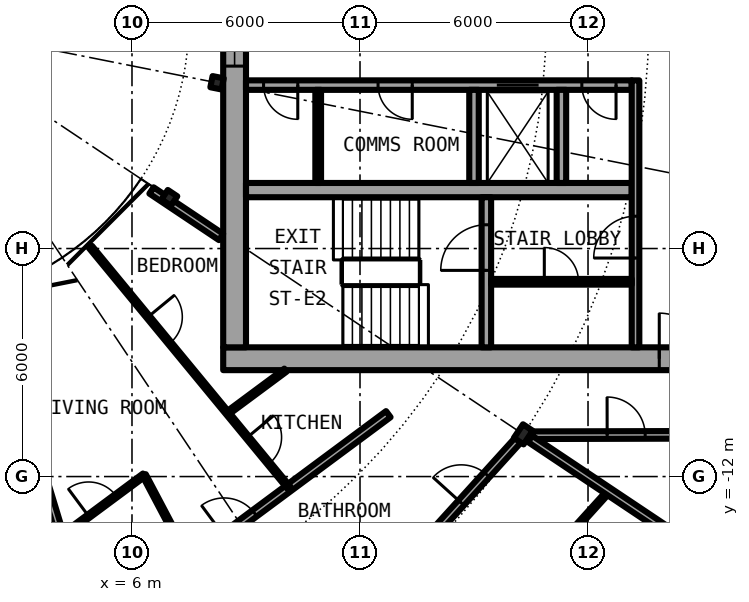
"""IFC4 building model, lengths in metres.
Left out: names, types, materials, properties, quantities, classifications, styles, units other than length and angle.
Written with IfcOpenShell. Run it as: python <this file> out.ifc"""

import sys

from ifc_helpers import new_model, si_unit, direction, frame, frame_2d, origin, origin_2d, place, context, subcontext, project, spatial, rectangle, i_section, extrude, element, fill, save


model = new_model("IFC4")
c1 = context("Model", 3, precision=1e-05, world=origin(), true_north=direction((0.0, 1.0)))
c2 = subcontext(c1, "Body", "Model", "MODEL_VIEW")
j1 = project(units=[si_unit("LENGTHUNIT", "METRE"), si_unit("PLANEANGLEUNIT", "RADIAN")], contexts=[c1])
p1 = place(None, origin())
s1 = spatial("IfcSite", under=j1, at=p1, CompositionType="ELEMENT")
p2 = place(p1, origin())
s2 = spatial("IfcBuilding", under=s1, at=p2, CompositionType="ELEMENT")
p3 = place(p2, frame((0.0, 0.0, 111.65)))
s3 = spatial("IfcBuildingStorey", under=s2, at=p3, CompositionType="ELEMENT", Elevation=111.65)
p4 = place(p3, frame((16.297, -10.889, 0.0), z_axis=(0.0, 0.0, 1.0), x_axis=(0.831469612303, -0.55557023302, 0.0)))
e1 = element("IfcColumn", 1, at=p4, inside=s3, PredefinedType="COLUMN", context=c2, shape_type="SweptSolid", body=[
    extrude(i_section(OverallWidth=0.307, OverallDepth=0.432, WebThickness=0.021, FlangeThickness=0.04, FilletRadius=0.027, at=origin_2d()), origin(), (0.0, 0.0, 1.0), 3.05),
])
for number, where, z_axis, x_axis in (
    (2, (6.984, -4.667, 0.0), (0.0, 0.0, 1.0), (0.831, -0.556, 0.0)),
    (3, (8.239, -1.639, 0.0), (0.0, 0.0, 1.0), (0.981, -0.195, 0.0)),
):
    element("IfcColumn", number, at=place(p3, frame(where, z_axis=z_axis, x_axis=x_axis)), inside=s3, PredefinedType="COLUMN", context=c2, shape_type="SweptSolid", body=[
        extrude(i_section(OverallWidth=0.3, OverallDepth=0.3, WebThickness=0.011, FlangeThickness=0.019, FilletRadius=0.027, at=origin_2d()), origin(), (0.0, 0.0, 1.0), 3.05),
    ])
p5 = place(p3, frame((8.4, -8.9, 0.0), z_axis=(0.0, 0.0, 1.0), x_axis=(1.0, 0.0, 0.0)))
e4 = element("IfcWall", 4, at=p5, inside=s3, PredefinedType="SHEAR", context=c2, shape_type="SweptSolid", body=[
    extrude(rectangle(XDim=13.8, YDim=0.6, at=frame_2d((6.9, 0.0))), origin(), (0.0, 0.0, 1.0), 3.05),
])
p6 = place(p5, frame((11.475, 0.0, 0.0)))
e5 = element("IfcOpeningElement", 5, at=p6, cuts=e4, PredefinedType="OPENING", context=c2, shape_type="SweptSolid", body=[
    extrude(rectangle(XDim=1.2, YDim=2.3, at=frame_2d((0.6, 1.15))), frame((0.0, 0.31, 0.0), z_axis=(0.0, -1.0, 0.0), x_axis=(1.0, 0.0, 0.0)), (0.0, 0.0, 1.0), 0.62),
])
p7 = place(p3, frame((8.7, -8.6, 0.0), z_axis=(0.0, 0.0, 1.0), x_axis=(0.0, 1.0, 0.0)))
e6 = element("IfcWall", 6, at=p7, inside=s3, PredefinedType="SHEAR", context=c2, shape_type="SweptSolid", body=[
    extrude(rectangle(XDim=17.2, YDim=0.6, at=frame_2d((8.6, 0.0))), origin(), (0.0, 0.0, 1.0), 3.05),
])
p8 = place(p7, frame((7.4, 0.0, 0.1)))
e7 = element("IfcOpeningElement", 7, at=p8, cuts=e6, PredefinedType="OPENING", context=c2, shape_type="SweptSolid", body=[
    extrude(rectangle(XDim=2.4, YDim=2.2, at=frame_2d((1.2, 1.1))), frame((0.0, 0.31, 0.0), z_axis=(0.0, -1.0, 0.0), x_axis=(1.0, 0.0, 0.0)), (0.0, 0.0, 1.0), 0.62),
])
p9 = place(p3, frame((19.15, -1.7, 0.0), z_axis=(0.0, 0.0, 1.0), x_axis=(-1.0, 0.0, 0.0)))
e8 = element("IfcWall", 8, at=p9, inside=s3, PredefinedType="SHEAR", context=c2, shape_type="SweptSolid", body=[
    extrude(rectangle(XDim=10.15, YDim=0.25, at=frame_2d((5.075, 0.0))), origin(), (0.0, 0.0, 1.0), 3.05),
])
p10 = place(p9, frame((2.45, 0.0, 0.0)))
e9 = element("IfcOpeningElement", 9, at=p10, cuts=e8, PredefinedType="OPENING", context=c2, shape_type="SweptSolid", body=[
    extrude(rectangle(XDim=1.1, YDim=2.3, at=frame_2d((0.55, 1.15))), frame((0.0, 0.135, 0.0), z_axis=(0.0, -1.0, 0.0), x_axis=(1.0, 0.0, 0.0)), (0.0, 0.0, 1.0), 0.27),
])
p11 = place(p9, frame((8.788, 0.0, 0.0)))
e10 = element("IfcOpeningElement", 10, at=p11, cuts=e8, PredefinedType="OPENING", context=c2, shape_type="SweptSolid", body=[
    extrude(rectangle(XDim=0.9, YDim=2.3, at=frame_2d((0.45, 1.15))), frame((0.0, 0.135, 0.0), z_axis=(0.0, -1.0, 0.0), x_axis=(1.0, 0.0, 0.0)), (0.0, 0.0, 1.0), 0.27),
])
p12 = place(p9, frame((5.775, 0.0, 0.0)))
e11 = element("IfcOpeningElement", 11, at=p12, cuts=e8, PredefinedType="OPENING", context=c2, shape_type="SweptSolid", body=[
    extrude(rectangle(XDim=0.9, YDim=2.3, at=frame_2d((0.45, 1.15))), frame((0.0, 0.135, 0.0), z_axis=(0.0, -1.0, 0.0), x_axis=(1.0, 0.0, 0.0)), (0.0, 0.0, 1.0), 0.27),
])
p13 = place(p9, frame((0.413, 0.0, 0.0)))
e12 = element("IfcOpeningElement", 12, at=p13, cuts=e8, PredefinedType="OPENING", context=c2, shape_type="SweptSolid", body=[
    extrude(rectangle(XDim=0.9, YDim=2.3, at=frame_2d((0.45, 1.15))), frame((0.0, 0.135, 0.0), z_axis=(0.0, -1.0, 0.0), x_axis=(1.0, 0.0, 0.0)), (0.0, 0.0, 1.0), 0.27),
])
p14 = place(p3, frame((9.0, -4.462, 0.0), z_axis=(0.0, 0.0, 1.0), x_axis=(1.0, 0.0, 0.0)))
e13 = element("IfcWall", 13, at=p14, inside=s3, PredefinedType="SHEAR", context=c2, shape_type="SweptSolid", body=[
    extrude(rectangle(XDim=10.15, YDim=0.375, at=frame_2d((5.075, 0.0))), origin(), (0.0, 0.0, 1.0), 3.05),
])
p15 = place(p3, frame((15.325, -8.6, 0.0), z_axis=(0.0, 0.0, 1.0), x_axis=(0.0, 1.0, 0.0)))
e14 = element("IfcWall", 14, at=p15, inside=s3, PredefinedType="SHEAR", context=c2, shape_type="SweptSolid", body=[
    extrude(rectangle(XDim=3.95, YDim=0.25, at=frame_2d((1.975, 0.0))), origin(), (0.0, 0.0, 1.0), 3.05),
])
p16 = place(p15, frame((2.025, 0.0, 0.0)))
e15 = element("IfcOpeningElement", 15, at=p16, cuts=e14, PredefinedType="OPENING", context=c2, shape_type="SweptSolid", body=[
    extrude(rectangle(XDim=1.2, YDim=2.3, at=frame_2d((0.6, 1.15))), frame((0.0, 0.135, 0.0), z_axis=(0.0, -1.0, 0.0), x_axis=(1.0, 0.0, 0.0)), (0.0, 0.0, 1.0), 0.27),
])
for number, where, z_axis, x_axis in (
    (16, (15.0, -1.825, 0.0), (0.0, 0.0, 1.0), (0.0, -1.0, 0.0)),
    (17, (17.3, -1.825, 0.0), (0.0, 0.0, 1.0), (0.0, -1.0, 0.0)),
):
    element("IfcWall", number, at=place(p3, frame(where, z_axis=z_axis, x_axis=x_axis)), inside=s3, PredefinedType="SOLIDWALL", context=c2, shape_type="SweptSolid", body=[
        extrude(rectangle(XDim=2.45, YDim=0.25, at=frame_2d((1.225, 0.0))), origin(), (0.0, 0.0, 1.0), 2.7),
    ])
p17 = place(p3, frame((19.25, -8.6, 0.0), z_axis=(0.0, 0.0, 1.0), x_axis=(0.0, 1.0, 0.0)))
e18 = element("IfcWall", 18, at=p17, inside=s3, PredefinedType="SOLIDWALL", context=c2, shape_type="SweptSolid", body=[
    extrude(rectangle(XDim=7.025, YDim=0.2, at=frame_2d((3.513, 0.0))), origin(), (0.0, 0.0, 1.0), 2.7),
])
p18 = place(p17, frame((2.35, 0.0, 0.0)))
e19 = element("IfcOpeningElement", 19, at=p18, cuts=e18, PredefinedType="OPENING", context=c2, shape_type="SweptSolid", body=[
    extrude(rectangle(XDim=1.1, YDim=2.3, at=frame_2d((0.55, 1.15))), frame((0.0, 0.11, 0.0), z_axis=(0.0, -1.0, 0.0), x_axis=(1.0, 0.0, 0.0)), (0.0, 0.0, 1.0), 0.22),
])
p19 = place(p3, frame((10.9, -1.825, 0.0), z_axis=(0.0, 0.0, 1.0), x_axis=(0.0, -1.0, 0.0)))
e20 = element("IfcWall", 20, at=p19, inside=s3, PredefinedType="PARTITIONING", context=c2, shape_type="SweptSolid", body=[
    extrude(rectangle(XDim=2.45, YDim=0.15, at=frame_2d((1.225, 0.0))), origin(), (0.0, 0.0, 1.0), 2.7),
])
p20 = place(p3, frame((15.45, -6.875, 0.0), z_axis=(0.0, 0.0, 1.0), x_axis=(1.0, 0.0, 0.0)))
e21 = element("IfcWall", 21, at=p20, inside=s3, PredefinedType="PARTITIONING", context=c2, shape_type="SweptSolid", body=[
    extrude(rectangle(XDim=3.7, YDim=0.15, at=frame_2d((1.85, 0.0))), origin(), (0.0, 0.0, 1.0), 2.7),
])
p21 = place(p20, frame((1.4, 0.0, 0.0)))
e22 = element("IfcOpeningElement", 22, at=p21, cuts=e21, PredefinedType="OPENING", context=c2, shape_type="SweptSolid", body=[
    extrude(rectangle(XDim=0.9, YDim=2.3, at=frame_2d((0.45, 1.15))), frame((0.0, 0.085, 0.0), z_axis=(0.0, -1.0, 0.0), x_axis=(1.0, 0.0, 0.0)), (0.0, 0.0, 1.0), 0.17),
])
p22 = place(p3, frame((17.077, -14.006, 0.0), z_axis=(0.0, 0.0, 1.0), x_axis=(0.671396556615, 0.741098282123, 0.0)))
e23 = element("IfcWall", 23, at=p22, inside=s3, PredefinedType="PARTITIONING", context=c2, shape_type="SweptSolid", body=[
    extrude(rectangle(XDim=2.182, YDim=0.1, at=frame_2d((1.091, 0.0))), origin(), (0.0, 0.0, 1.0), 2.7),
])
p23 = place(p3, frame((12.434, -15.151, 0.0), z_axis=(0.0, 0.0, 1.0), x_axis=(0.671481997275, 0.741020868354, 0.0)))
e24 = element("IfcWall", 24, at=p23, inside=s3, PredefinedType="PARTITIONING", context=c2, shape_type="SweptSolid", body=[
    extrude(rectangle(XDim=5.596, YDim=0.2, at=frame_2d((2.798, 0.0))), origin(), (0.0, 0.0, 1.0), 2.39),
])
p24 = place(p23, frame((3.319, 0.0, 0.0)))
e25 = element("IfcOpeningElement", 25, at=p24, cuts=e24, PredefinedType="OPENING", context=c2, shape_type="SweptSolid", body=[
    extrude(rectangle(XDim=1.0, YDim=2.3, at=frame_2d((0.5, 1.15))), frame((0.0, 0.11, 0.0), z_axis=(0.0, -1.0, 0.0), x_axis=(1.0, 0.0, 0.0)), (0.0, 0.0, 1.0), 0.22),
])
p25 = place(p3, frame((4.906, -16.172, 0.0), z_axis=(0.0, 0.0, 1.0), x_axis=(0.803191461888, 0.595720971219, 0.0)))
e26 = element("IfcWall", 26, at=p25, inside=s3, PredefinedType="PARTITIONING", context=c2, shape_type="SweptSolid", body=[
    extrude(rectangle(XDim=9.76, YDim=0.2, at=frame_2d((4.88, 0.0))), origin(), (0.0, 0.0, 1.0), 2.7),
])
p26 = place(p25, frame((4.38, 0.0, 0.0)))
e27 = element("IfcOpeningElement", 27, at=p26, cuts=e26, PredefinedType="OPENING", context=c2, shape_type="SweptSolid", body=[
    extrude(rectangle(XDim=1.0, YDim=2.3, at=frame_2d((0.5, 1.15))), frame((0.0, 0.11, 0.0), z_axis=(0.0, -1.0, 0.0), x_axis=(1.0, 0.0, 0.0)), (0.0, 0.0, 1.0), 0.22),
])
p27 = place(p3, frame((4.122, -13.589, 0.0), z_axis=(0.0, 0.0, 1.0), x_axis=(0.803128348509, 0.595806055542, 0.0)))
e28 = element("IfcWall", 28, at=p27, inside=s3, PredefinedType="PARTITIONING", context=c2, shape_type="SweptSolid", body=[
    extrude(rectangle(XDim=2.734, YDim=0.1, at=frame_2d((1.367, 0.0))), origin(), (0.0, 0.0, 1.0), 2.7),
])
p28 = place(p27, frame((0.917, 0.0, 0.0)))
e29 = element("IfcOpeningElement", 29, at=p28, cuts=e28, PredefinedType="OPENING", context=c2, shape_type="SweptSolid", body=[
    extrude(rectangle(XDim=0.9, YDim=2.3, at=frame_2d((0.45, 1.15))), frame((0.0, 0.06, 0.0), z_axis=(0.0, -1.0, 0.0), x_axis=(1.0, 0.0, 0.0)), (0.0, 0.0, 1.0), 0.12),
])
p29 = place(p3, frame((8.513, -10.332, 0.0), z_axis=(0.0, 0.0, 1.0), x_axis=(0.803149591038, 0.595777420196, 0.0)))
e30 = element("IfcWall", 30, at=p29, inside=s3, PredefinedType="PARTITIONING", context=c2, shape_type="SweptSolid", body=[
    extrude(rectangle(XDim=1.9, YDim=0.1, at=frame_2d((0.95, 0.0))), origin(), (0.0, 0.0, 1.0), 2.7),
])
p30 = place(p3, frame((16.541, -10.912, 0.0), z_axis=(0.0, 0.0, 1.0), x_axis=(0.999997173357, 0.002377662213, 0.0)))
e31 = element("IfcWall", 31, at=p30, inside=s3, PredefinedType="PARTITIONING", context=c2, shape_type="SweptSolid", body=[
    extrude(rectangle(XDim=5.134, YDim=0.2, at=frame_2d((2.567, 0.0))), origin(), (0.0, 0.0, 1.0), 2.7),
])
p31 = place(p30, frame((1.963, 0.0, 0.0)))
e32 = element("IfcOpeningElement", 32, at=p31, cuts=e31, PredefinedType="OPENING", context=c2, shape_type="SweptSolid", body=[
    extrude(rectangle(XDim=1.0, YDim=2.3, at=frame_2d((0.5, 1.15))), frame((0.0, 0.11, 0.0), z_axis=(0.0, -1.0, 0.0), x_axis=(1.0, 0.0, 0.0)), (0.0, 0.0, 1.0), 0.22),
])
p32 = place(p3, frame((6.513, -4.472, 0.0), z_axis=(0.0, 0.0, 1.0), x_axis=(0.831333375071, -0.555774072347, 0.0)))
e33 = element("IfcWall", 33, at=p32, inside=s3, PredefinedType="PARTITIONING", context=c2, shape_type="SweptSolid", body=[
    extrude(rectangle(XDim=2.203, YDim=0.2, at=frame_2d((1.101, 0.0))), origin(), (0.0, 0.0, 1.0), 2.7),
])
p33 = place(p3, frame((2.24, -7.388, 0.0), z_axis=(0.0, 0.0, 1.0), x_axis=(0.290420725025, -0.956899055531, 0.0)))
e34 = element("IfcWall", 34, at=p33, inside=s3, PredefinedType="PARTITIONING", context=c2, shape_type="SweptSolid", body=[
    extrude(rectangle(XDim=9.18, YDim=0.2, at=frame_2d((4.59, 0.0))), origin(), (0.0, 0.0, 1.0), 2.7),
])
p34 = place(p3, frame((4.908, -5.959, 0.0), z_axis=(0.0, 0.0, 1.0), x_axis=(0.636105207978, -0.771602335652, 0.0)))
e35 = element("IfcWall", 35, at=p34, inside=s3, PredefinedType="PARTITIONING", context=c2, shape_type="SweptSolid", body=[
    extrude(rectangle(XDim=8.213, YDim=0.1, at=frame_2d((4.106, 0.0))), origin(), (0.0, 0.0, 1.0), 2.7),
])
p35 = place(p34, frame((6.49, 0.0, 0.0)))
e36 = element("IfcOpeningElement", 36, at=p35, cuts=e35, PredefinedType="OPENING", context=c2, shape_type="SweptSolid", body=[
    extrude(rectangle(XDim=0.9, YDim=2.3, at=frame_2d((0.45, 1.15))), frame((0.0, 0.06, 0.0), z_axis=(0.0, -1.0, 0.0), x_axis=(1.0, 0.0, 0.0)), (0.0, 0.0, 1.0), 0.12),
])
p36 = place(p34, frame((2.384, 0.0, 0.0)))
e37 = element("IfcOpeningElement", 37, at=p36, cuts=e35, PredefinedType="OPENING", context=c2, shape_type="SweptSolid", body=[
    extrude(rectangle(XDim=0.9, YDim=2.3, at=frame_2d((0.45, 1.15))), frame((0.0, 0.06, 0.0), z_axis=(0.0, -1.0, 0.0), x_axis=(1.0, 0.0, 0.0)), (0.0, 0.0, 1.0), 0.12),
])
p37 = place(p3, frame((6.318, -11.96, 0.0), z_axis=(0.0, 0.0, 1.0), x_axis=(0.467001992543, -0.884256263173, 0.0)))
e38 = element("IfcWall", 38, at=p37, inside=s3, PredefinedType="PARTITIONING", context=c2, shape_type="SweptSolid", body=[
    extrude(rectangle(XDim=2.572, YDim=0.1, at=frame_2d((1.286, 0.0))), origin(), (0.0, 0.0, 1.0), 2.7),
])
p38 = place(p3, frame((16.477, -11.009, 0.0), z_axis=(0.0, 0.0, 1.0), x_axis=(0.831467903109, -0.555572791, 0.0)))
e39 = element("IfcWall", 39, at=p38, inside=s3, PredefinedType="PARTITIONING", context=c2, shape_type="SweptSolid", body=[
    extrude(rectangle(XDim=7.358, YDim=0.2, at=frame_2d((3.679, 0.0))), origin(), (0.0, 0.0, 1.0), 2.7),
])
p39 = place(p10, origin())
e40 = element("IfcDoor", 40, at=p39, inside=s3, OperationType="DOUBLE_DOOR_SLIDING", PredefinedType="DOOR", context=c2, shape_type="SweptSolid", body=[
    extrude(rectangle(XDim=1.1, YDim=2.3, at=frame_2d((0.55, 1.15))), frame((0.0, 0.025, 0.0), z_axis=(0.0, -1.0, 0.0), x_axis=(1.0, 0.0, 0.0)), (0.0, 0.0, 1.0), 0.05),
])
fill(e9, e40)
p40 = place(p11, origin())
e41 = element("IfcDoor", 41, at=p40, inside=s3, OperationType="SINGLE_SWING_LEFT", PredefinedType="DOOR", context=c2, shape_type="SweptSolid", body=[
    extrude(rectangle(XDim=0.9, YDim=2.3, at=frame_2d((0.45, 1.15))), frame((0.0, 0.025, 0.0), z_axis=(0.0, -1.0, 0.0), x_axis=(1.0, 0.0, 0.0)), (0.0, 0.0, 1.0), 0.05),
])
fill(e10, e41)
p41 = place(p12, origin())
e42 = element("IfcDoor", 42, at=p41, inside=s3, OperationType="SINGLE_SWING_LEFT", PredefinedType="DOOR", context=c2, shape_type="SweptSolid", body=[
    extrude(rectangle(XDim=0.9, YDim=2.3, at=frame_2d((0.45, 1.15))), frame((0.0, 0.025, 0.0), z_axis=(0.0, -1.0, 0.0), x_axis=(1.0, 0.0, 0.0)), (0.0, 0.0, 1.0), 0.05),
])
fill(e11, e42)
p42 = place(p13, origin())
e43 = element("IfcDoor", 43, at=p42, inside=s3, OperationType="SINGLE_SWING_RIGHT", PredefinedType="DOOR", context=c2, shape_type="SweptSolid", body=[
    extrude(rectangle(XDim=0.9, YDim=2.3, at=frame_2d((0.45, 1.15))), frame((0.0, 0.025, 0.0), z_axis=(0.0, -1.0, 0.0), x_axis=(1.0, 0.0, 0.0)), (0.0, 0.0, 1.0), 0.05),
])
fill(e12, e43)
p43 = place(p21, origin())
e44 = element("IfcDoor", 44, at=p43, inside=s3, OperationType="SINGLE_SWING_LEFT", PredefinedType="DOOR", context=c2, shape_type="SweptSolid", body=[
    extrude(rectangle(XDim=0.9, YDim=2.3, at=frame_2d((0.45, 1.15))), frame((0.0, 0.025, 0.0), z_axis=(0.0, -1.0, 0.0), x_axis=(1.0, 0.0, 0.0)), (0.0, 0.0, 1.0), 0.05),
])
fill(e22, e44)
p44 = place(p16, origin())
e45 = element("IfcDoor", 45, at=p44, inside=s3, OperationType="SINGLE_SWING_LEFT", PredefinedType="DOOR", context=c2, shape_type="SweptSolid", body=[
    extrude(rectangle(XDim=1.2, YDim=2.3, at=frame_2d((0.6, 1.15))), frame((0.0, 0.025, 0.0), z_axis=(0.0, -1.0, 0.0), x_axis=(1.0, 0.0, 0.0)), (0.0, 0.0, 1.0), 0.05),
])
fill(e15, e45)
p45 = place(p18, origin())
e46 = element("IfcDoor", 46, at=p45, inside=s3, OperationType="SINGLE_SWING_RIGHT", PredefinedType="DOOR", context=c2, shape_type="SweptSolid", body=[
    extrude(rectangle(XDim=1.1, YDim=2.3, at=frame_2d((0.55, 1.15))), frame((0.0, 0.025, 0.0), z_axis=(0.0, -1.0, 0.0), x_axis=(1.0, 0.0, 0.0)), (0.0, 0.0, 1.0), 0.05),
])
fill(e19, e46)
p46 = place(p6, origin())
e47 = element("IfcDoor", 47, at=p46, inside=s3, OperationType="SINGLE_SWING_LEFT", PredefinedType="DOOR", context=c2, shape_type="SweptSolid", body=[
    extrude(rectangle(XDim=1.2, YDim=2.3, at=frame_2d((0.6, 1.15))), frame((0.0, 0.025, 0.0), z_axis=(0.0, -1.0, 0.0), x_axis=(1.0, 0.0, 0.0)), (0.0, 0.0, 1.0), 0.05),
])
fill(e5, e47)
p47 = place(p8, origin())
e48 = element("IfcWindow", 48, at=p47, inside=s3, PartitioningType="SINGLE_PANEL", PredefinedType="WINDOW", context=c2, shape_type="SweptSolid", body=[
    extrude(rectangle(XDim=2.4, YDim=2.2, at=frame_2d((1.2, 1.1))), frame((0.0, 0.03, 0.0), z_axis=(0.0, -1.0, 0.0), x_axis=(1.0, 0.0, 0.0)), (0.0, 0.0, 1.0), 0.06),
])
fill(e7, e48)
p48 = place(p24, origin())
e49 = element("IfcDoor", 49, at=p48, inside=s3, OperationType="SINGLE_SWING_RIGHT", PredefinedType="DOOR", context=c2, shape_type="SweptSolid", body=[
    extrude(rectangle(XDim=1.0, YDim=2.3, at=frame_2d((0.5, 1.15))), frame((0.0, 0.025, 0.0), z_axis=(0.0, -1.0, 0.0), x_axis=(1.0, 0.0, 0.0)), (0.0, 0.0, 1.0), 0.05),
])
fill(e25, e49)
p49 = place(p26, origin())
e50 = element("IfcDoor", 50, at=p49, inside=s3, OperationType="SINGLE_SWING_LEFT", PredefinedType="DOOR", context=c2, shape_type="SweptSolid", body=[
    extrude(rectangle(XDim=1.0, YDim=2.3, at=frame_2d((0.5, 1.15))), frame((0.0, 0.025, 0.0), z_axis=(0.0, -1.0, 0.0), x_axis=(1.0, 0.0, 0.0)), (0.0, 0.0, 1.0), 0.05),
])
fill(e27, e50)
p50 = place(p28, origin())
e51 = element("IfcDoor", 51, at=p50, inside=s3, OperationType="SINGLE_SWING_RIGHT", PredefinedType="DOOR", context=c2, shape_type="SweptSolid", body=[
    extrude(rectangle(XDim=0.9, YDim=2.3, at=frame_2d((0.45, 1.15))), frame((0.0, 0.025, 0.0), z_axis=(0.0, -1.0, 0.0), x_axis=(1.0, 0.0, 0.0)), (0.0, 0.0, 1.0), 0.05),
])
fill(e29, e51)
p51 = place(p35, origin())
e52 = element("IfcDoor", 52, at=p51, inside=s3, OperationType="SINGLE_SWING_RIGHT", PredefinedType="DOOR", context=c2, shape_type="SweptSolid", body=[
    extrude(rectangle(XDim=0.9, YDim=2.3, at=frame_2d((0.45, 1.15))), frame((0.0, 0.025, 0.0), z_axis=(0.0, -1.0, 0.0), x_axis=(1.0, 0.0, 0.0)), (0.0, 0.0, 1.0), 0.05),
])
fill(e36, e52)
p52 = place(p36, origin())
e53 = element("IfcDoor", 53, at=p52, inside=s3, OperationType="SINGLE_SWING_LEFT", PredefinedType="DOOR", context=c2, shape_type="SweptSolid", body=[
    extrude(rectangle(XDim=0.9, YDim=2.3, at=frame_2d((0.45, 1.15))), frame((0.0, 0.025, 0.0), z_axis=(0.0, -1.0, 0.0), x_axis=(1.0, 0.0, 0.0)), (0.0, 0.0, 1.0), 0.05),
])
fill(e37, e53)
p53 = place(p31, origin())
e54 = element("IfcDoor", 54, at=p53, inside=s3, OperationType="SINGLE_SWING_LEFT", PredefinedType="DOOR", context=c2, shape_type="SweptSolid", body=[
    extrude(rectangle(XDim=1.0, YDim=2.3, at=frame_2d((0.5, 1.15))), frame((0.0, 0.025, 0.0), z_axis=(0.0, -1.0, 0.0), x_axis=(1.0, 0.0, 0.0)), (0.0, 0.0, 1.0), 0.05),
])
fill(e32, e54)
save(model, sys.argv[1])
